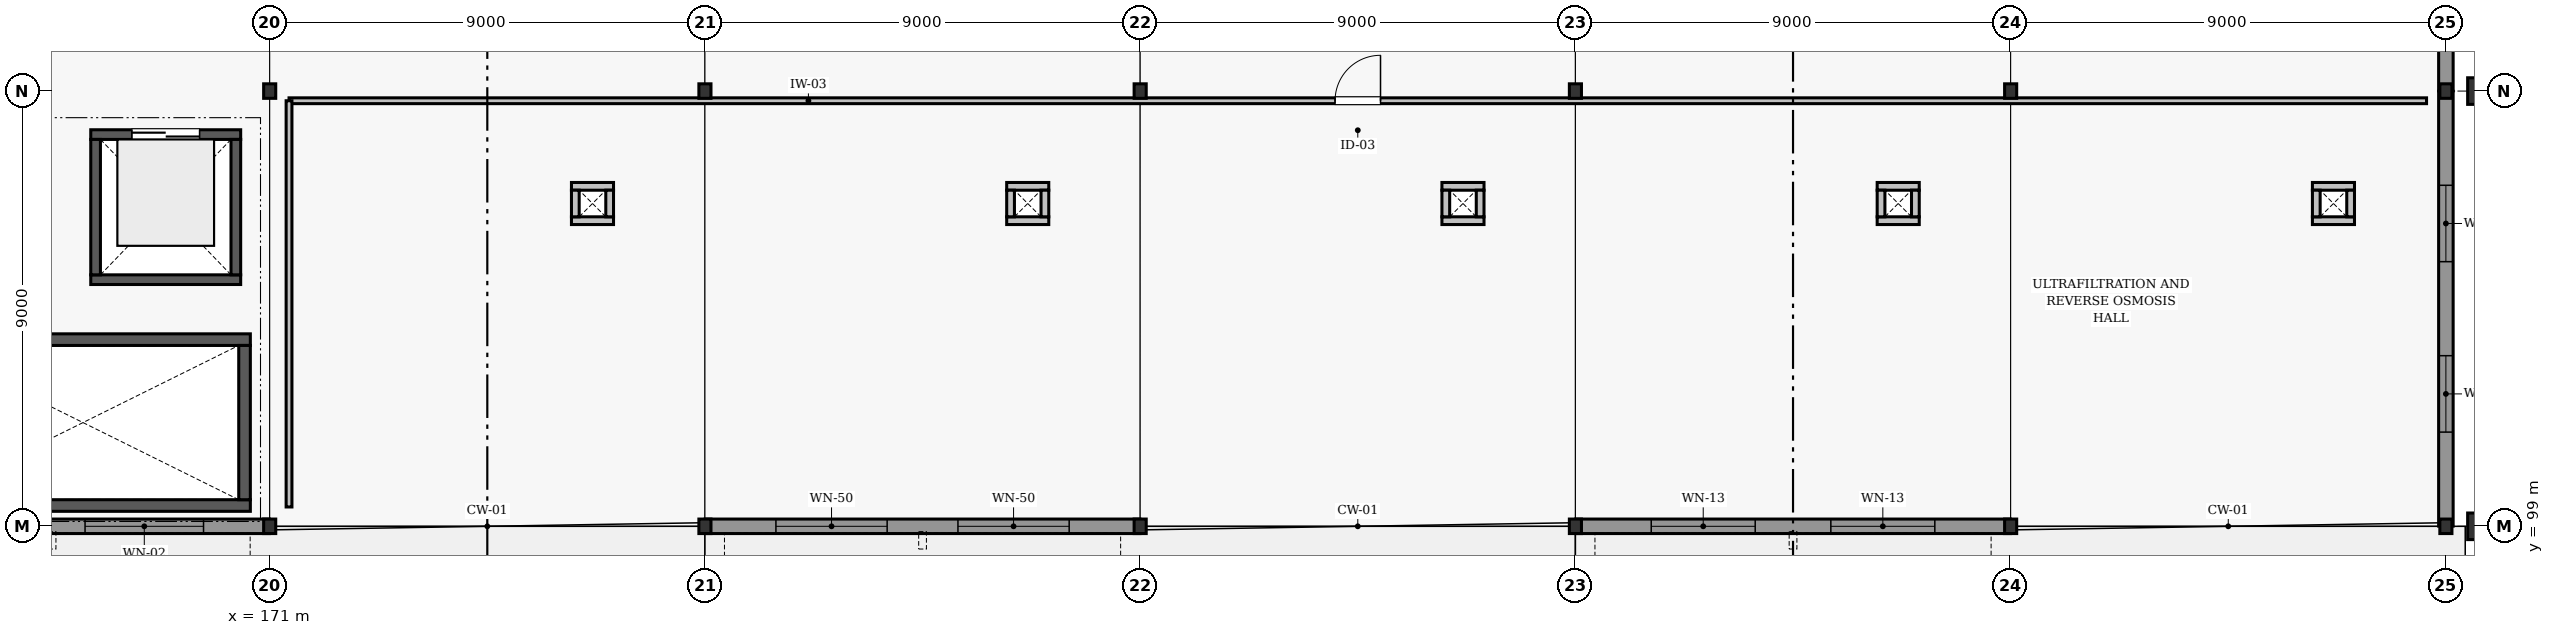
"""IFC4 building model, lengths in metres.
Left out: names, types, materials, properties, quantities, classifications, styles, units other than length and angle.
Written with IfcOpenShell. Run it as: python <this file> out.ifc"""

import sys

from ifc_helpers import new_model, si_unit, direction, frame, frame_2d, origin, origin_2d, place, context, subcontext, project, spatial, rectangle, i_section, extrude, element, fill, save


model = new_model("IFC4")
c1 = context("Model", 3, precision=1e-05, world=origin(), true_north=direction((0.0, 1.0)))
c2 = subcontext(c1, "Body", "Model", "MODEL_VIEW")
j1 = project(units=[si_unit("LENGTHUNIT", "METRE"), si_unit("PLANEANGLEUNIT", "RADIAN")], contexts=[c1])
p1 = place(None, origin())
s1 = spatial("IfcSite", under=j1, at=p1, CompositionType="ELEMENT")
p2 = place(p1, origin())
s2 = spatial("IfcBuilding", under=s1, at=p2, CompositionType="ELEMENT")
p3 = place(p2, frame((0.0, 0.0, 4.8)))
s3 = spatial("IfcBuildingStorey", under=s2, at=p3, CompositionType="ELEMENT", Elevation=4.8)
for number, where, z_axis, x_axis in (
    (1, (171.0, 99.0, 0.0), (0.0, 0.0, 1.0), (1.0, 0.0, 0.0)),
    (2, (171.0, 108.0, 0.0), (0.0, 0.0, 1.0), (1.0, 0.0, 0.0)),
    (3, (180.0, 99.0, 0.0), (0.0, 0.0, 1.0), (1.0, 0.0, 0.0)),
    (4, (180.0, 108.0, 0.0), (0.0, 0.0, 1.0), (1.0, 0.0, 0.0)),
    (5, (189.0, 99.0, 0.0), (0.0, 0.0, 1.0), (1.0, 0.0, 0.0)),
    (6, (189.0, 108.0, 0.0), (0.0, 0.0, 1.0), (1.0, 0.0, 0.0)),
    (7, (198.0, 99.0, 0.0), (0.0, 0.0, 1.0), (1.0, 0.0, 0.0)),
    (8, (198.0, 108.0, 0.0), (0.0, 0.0, 1.0), (1.0, 0.0, 0.0)),
    (9, (207.0, 99.0, 0.0), (0.0, 0.0, 1.0), (1.0, 0.0, 0.0)),
    (10, (207.0, 108.0, 0.0), (0.0, 0.0, 1.0), (1.0, 0.0, 0.0)),
    (11, (216.0, 99.0, 0.0), (0.0, 0.0, 1.0), (1.0, 0.0, 0.0)),
    (12, (216.0, 108.0, 0.0), (0.0, 0.0, 1.0), (1.0, 0.0, 0.0)),
):
    element("IfcColumn", number, at=place(p3, frame(where, z_axis=z_axis, x_axis=x_axis)), inside=s3, PredefinedType="COLUMN", context=c2, shape_type="SweptSolid", body=[
        extrude(i_section(OverallWidth=0.25, OverallDepth=0.3, WebThickness=0.01, FlangeThickness=0.01, FilletRadius=0.012, at=origin_2d()), origin(), (0.0, 0.0, 1.0), 3.6),
    ])
for number, where, z_axis, x_axis in (
    (13, (216.85, 99.0, 0.0), (0.0, 0.0, 1.0), (0.0, 1.0, 0.0)),
    (14, (216.85, 108.0, 0.0), (0.0, 0.0, 1.0), (0.0, 1.0, 0.0)),
):
    element("IfcColumn", number, at=place(p3, frame(where, z_axis=z_axis, x_axis=x_axis)), inside=s3, PredefinedType="PILASTER", context=c2, shape_type="SweptSolid", body=[
        extrude(rectangle(XDim=0.55, YDim=0.8, at=origin_2d()), origin(), (0.0, 0.0, 1.0), 3.6),
    ])
p4 = place(p3, frame((162.004, 99.0, 0.0), z_axis=(0.0, 0.0, 1.0), x_axis=(1.0, 0.0, 0.0)))
e15 = element("IfcWall", 15, at=p4, inside=s3, PredefinedType="SOLIDWALL", context=c2, shape_type="SweptSolid", body=[
    extrude(rectangle(XDim=8.992, YDim=0.3, at=frame_2d((4.496, 0.0))), origin(), (0.0, 0.0, 1.0), 2.842),
])
p5 = place(p4, frame((1.364, 0.0, 1.45)))
e16 = element("IfcOpeningElement", 16, at=p5, cuts=e15, PredefinedType="OPENING", context=c2, shape_type="SweptSolid", body=[
    extrude(rectangle(XDim=2.45, YDim=1.2, at=frame_2d((1.225, 0.6))), frame((0.0, 0.16, 0.0), z_axis=(0.0, -1.0, 0.0), x_axis=(1.0, 0.0, 0.0)), (0.0, 0.0, 1.0), 0.32),
])
p6 = place(p4, frame((5.178, 0.0, 1.45)))
e17 = element("IfcOpeningElement", 17, at=p6, cuts=e15, PredefinedType="OPENING", context=c2, shape_type="SweptSolid", body=[
    extrude(rectangle(XDim=2.45, YDim=1.2, at=frame_2d((1.225, 0.6))), frame((0.0, 0.16, 0.0), z_axis=(0.0, -1.0, 0.0), x_axis=(1.0, 0.0, 0.0)), (0.0, 0.0, 1.0), 0.32),
])
p7 = place(p3, frame((180.004, 99.0, 0.0), z_axis=(0.0, 0.0, 1.0), x_axis=(1.0, 0.0, 0.0)))
e18 = element("IfcWall", 18, at=p7, inside=s3, PredefinedType="SOLIDWALL", context=c2, shape_type="SweptSolid", body=[
    extrude(rectangle(XDim=8.992, YDim=0.3, at=frame_2d((4.496, 0.0))), origin(), (0.0, 0.0, 1.0), 2.842),
])
p8 = place(p7, frame((1.464, 0.0, 1.5)))
e19 = element("IfcOpeningElement", 19, at=p8, cuts=e18, PredefinedType="OPENING", context=c2, shape_type="SweptSolid", body=[
    extrude(rectangle(XDim=2.3, YDim=1.16, at=frame_2d((1.15, 0.58))), frame((0.0, 0.16, 0.0), z_axis=(0.0, -1.0, 0.0), x_axis=(1.0, 0.0, 0.0)), (0.0, 0.0, 1.0), 0.32),
])
p9 = place(p7, frame((5.228, 0.0, 1.5)))
e20 = element("IfcOpeningElement", 20, at=p9, cuts=e18, PredefinedType="OPENING", context=c2, shape_type="SweptSolid", body=[
    extrude(rectangle(XDim=2.3, YDim=1.16, at=frame_2d((1.15, 0.58))), frame((0.0, 0.16, 0.0), z_axis=(0.0, -1.0, 0.0), x_axis=(1.0, 0.0, 0.0)), (0.0, 0.0, 1.0), 0.32),
])
p10 = place(p3, frame((198.004, 99.0, 0.0), z_axis=(0.0, 0.0, 1.0), x_axis=(1.0, 0.0, 0.0)))
e21 = element("IfcWall", 21, at=p10, inside=s3, PredefinedType="SOLIDWALL", context=c2, shape_type="SweptSolid", body=[
    extrude(rectangle(XDim=8.992, YDim=0.3, at=frame_2d((4.496, 0.0))), origin(), (0.0, 0.0, 1.0), 2.842),
])
p11 = place(p10, frame((1.564, 0.0, 1.5)))
e22 = element("IfcOpeningElement", 22, at=p11, cuts=e21, PredefinedType="OPENING", context=c2, shape_type="SweptSolid", body=[
    extrude(rectangle(XDim=2.15, YDim=1.12, at=frame_2d((1.075, 0.56))), frame((0.0, 0.16, 0.0), z_axis=(0.0, -1.0, 0.0), x_axis=(1.0, 0.0, 0.0)), (0.0, 0.0, 1.0), 0.32),
])
p12 = place(p10, frame((5.278, 0.0, 1.5)))
e23 = element("IfcOpeningElement", 23, at=p12, cuts=e21, PredefinedType="OPENING", context=c2, shape_type="SweptSolid", body=[
    extrude(rectangle(XDim=2.15, YDim=1.12, at=frame_2d((1.075, 0.56))), frame((0.0, 0.16, 0.0), z_axis=(0.0, -1.0, 0.0), x_axis=(1.0, 0.0, 0.0)), (0.0, 0.0, 1.0), 0.32),
])
p13 = place(p3, frame((216.0, 99.004, 0.0), z_axis=(0.0, 0.0, 1.0), x_axis=(0.0, 1.0, 0.0)))
e24 = element("IfcWall", 24, at=p13, inside=s3, PredefinedType="SOLIDWALL", context=c2, shape_type="SweptSolid", body=[
    extrude(rectangle(XDim=8.992, YDim=0.3, at=frame_2d((4.496, 0.0))), origin(), (0.0, 0.0, 1.0), 2.842),
])
p14 = place(p13, frame((1.944, 0.0, 0.85)))
e25 = element("IfcOpeningElement", 25, at=p14, cuts=e24, PredefinedType="OPENING", context=c2, shape_type="SweptSolid", body=[
    extrude(rectangle(XDim=1.58, YDim=1.6, at=frame_2d((0.79, 0.8))), frame((0.0, 0.16, 0.0), z_axis=(0.0, -1.0, 0.0), x_axis=(1.0, 0.0, 0.0)), (0.0, 0.0, 1.0), 0.32),
])
p15 = place(p13, frame((5.468, 0.0, 0.85)))
e26 = element("IfcOpeningElement", 26, at=p15, cuts=e24, PredefinedType="OPENING", context=c2, shape_type="SweptSolid", body=[
    extrude(rectangle(XDim=1.58, YDim=1.6, at=frame_2d((0.79, 0.8))), frame((0.0, 0.16, 0.0), z_axis=(0.0, -1.0, 0.0), x_axis=(1.0, 0.0, 0.0)), (0.0, 0.0, 1.0), 0.32),
])
p16 = place(p3, frame((216.0, 108.004, 0.0), z_axis=(0.0, 0.0, 1.0), x_axis=(0.0, 1.0, 0.0)))
e27 = element("IfcWall", 27, at=p16, inside=s3, PredefinedType="SOLIDWALL", context=c2, shape_type="SweptSolid", body=[
    extrude(rectangle(XDim=8.992, YDim=0.3, at=frame_2d((4.496, 0.0))), origin(), (0.0, 0.0, 1.0), 2.842),
])
p17 = place(p16, frame((2.011, 0.0, 0.85)))
e28 = element("IfcOpeningElement", 28, at=p17, cuts=e27, PredefinedType="OPENING", context=c2, shape_type="SweptSolid", body=[
    extrude(rectangle(XDim=1.48, YDim=1.56, at=frame_2d((0.74, 0.78))), frame((0.0, 0.16, 0.0), z_axis=(0.0, -1.0, 0.0), x_axis=(1.0, 0.0, 0.0)), (0.0, 0.0, 1.0), 0.32),
])
p18 = place(p16, frame((5.501, 0.0, 0.85)))
e29 = element("IfcOpeningElement", 29, at=p18, cuts=e27, PredefinedType="OPENING", context=c2, shape_type="SweptSolid", body=[
    extrude(rectangle(XDim=1.48, YDim=1.56, at=frame_2d((0.74, 0.78))), frame((0.0, 0.16, 0.0), z_axis=(0.0, -1.0, 0.0), x_axis=(1.0, 0.0, 0.0)), (0.0, 0.0, 1.0), 0.32),
])
p19 = place(p3, frame((162.16, 99.43, 0.0), z_axis=(0.0, 0.0, 1.0), x_axis=(1.0, 0.0, 0.0)))
e30 = element("IfcWall", 30, at=p19, inside=s3, PredefinedType="SHEAR", context=c2, shape_type="SweptSolid", body=[
    extrude(rectangle(XDim=8.44, YDim=0.24, at=frame_2d((4.22, 0.0))), origin(), (0.0, 0.0, 1.0), 3.35),
])
p20 = place(p3, frame((162.16, 102.86, 0.0), z_axis=(0.0, 0.0, 1.0), x_axis=(1.0, 0.0, 0.0)))
e31 = element("IfcWall", 31, at=p20, inside=s3, PredefinedType="SHEAR", context=c2, shape_type="SweptSolid", body=[
    extrude(rectangle(XDim=8.44, YDim=0.24, at=frame_2d((4.22, 0.0))), origin(), (0.0, 0.0, 1.0), 3.35),
])
p21 = place(p20, frame((0.46, 0.0, 0.0)))
e32 = element("IfcOpeningElement", 32, at=p21, cuts=e31, PredefinedType="OPENING", context=c2, shape_type="SweptSolid", body=[
    extrude(rectangle(XDim=1.08, YDim=2.08, at=frame_2d((0.54, 1.04))), frame((0.0, 0.13, 0.0), z_axis=(0.0, -1.0, 0.0), x_axis=(1.0, 0.0, 0.0)), (0.0, 0.0, 1.0), 0.26),
])
p22 = place(p3, frame((170.48, 99.55, 0.0), z_axis=(0.0, 0.0, 1.0), x_axis=(0.0, 1.0, 0.0)))
e33 = element("IfcWall", 33, at=p22, inside=s3, PredefinedType="SHEAR", context=c2, shape_type="SweptSolid", body=[
    extrude(rectangle(XDim=3.19, YDim=0.24, at=frame_2d((1.595, 0.0))), origin(), (0.0, 0.0, 1.0), 3.35),
])
p23 = place(p3, frame((167.3, 104.1, 0.0), z_axis=(0.0, 0.0, 1.0), x_axis=(1.0, 0.0, 0.0)))
e34 = element("IfcWall", 34, at=p23, inside=s3, PredefinedType="SHEAR", context=c2, shape_type="SweptSolid", body=[
    extrude(rectangle(XDim=3.1, YDim=0.2, at=frame_2d((1.55, 0.0))), origin(), (0.0, 0.0, 1.0), 3.35),
])
p24 = place(p3, frame((167.3, 107.1, 0.0), z_axis=(0.0, 0.0, 1.0), x_axis=(1.0, 0.0, 0.0)))
e35 = element("IfcWall", 35, at=p24, inside=s3, PredefinedType="SHEAR", context=c2, shape_type="SweptSolid", body=[
    extrude(rectangle(XDim=3.1, YDim=0.2, at=frame_2d((1.55, 0.0))), origin(), (0.0, 0.0, 1.0), 3.35),
])
p25 = place(p24, frame((0.85, 0.0, 0.0)))
e36 = element("IfcOpeningElement", 36, at=p25, cuts=e35, PredefinedType="OPENING", context=c2, shape_type="SweptSolid", body=[
    extrude(rectangle(XDim=1.4, YDim=2.15, at=frame_2d((0.7, 1.075))), frame((0.0, 0.11, 0.0), z_axis=(0.0, -1.0, 0.0), x_axis=(1.0, 0.0, 0.0)), (0.0, 0.0, 1.0), 0.22),
])
for number, where, z_axis, x_axis in (
    (37, (167.4, 104.2, 0.0), (0.0, 0.0, 1.0), (0.0, 1.0, 0.0)),
    (38, (170.3, 104.2, 0.0), (0.0, 0.0, 1.0), (0.0, 1.0, 0.0)),
):
    element("IfcWall", number, at=place(p3, frame(where, z_axis=z_axis, x_axis=x_axis)), inside=s3, PredefinedType="SHEAR", context=c2, shape_type="SweptSolid", body=[
        extrude(rectangle(XDim=2.8, YDim=0.2, at=frame_2d((1.4, 0.0))), origin(), (0.0, 0.0, 1.0), 3.35),
    ])
for number, where, z_axis, x_axis in (
    (39, (177.24, 105.32, 0.0), (0.0, 0.0, 1.0), (1.0, 0.0, 0.0)),
    (40, (177.24, 106.03, 0.0), (0.0, 0.0, 1.0), (1.0, 0.0, 0.0)),
):
    element("IfcWall", number, at=place(p3, frame(where, z_axis=z_axis, x_axis=x_axis)), inside=s3, PredefinedType="PARTITIONING", context=c2, shape_type="SweptSolid", body=[
        extrude(rectangle(XDim=0.87, YDim=0.16, at=frame_2d((0.435, 0.0))), origin(), (0.0, 0.0, 1.0), 3.35),
    ])
for number, where, z_axis, x_axis in (
    (41, (177.32, 105.4, 0.0), (0.0, 0.0, 1.0), (0.0, 1.0, 0.0)),
    (42, (178.03, 105.4, 0.0), (0.0, 0.0, 1.0), (0.0, 1.0, 0.0)),
):
    element("IfcWall", number, at=place(p3, frame(where, z_axis=z_axis, x_axis=x_axis)), inside=s3, PredefinedType="PARTITIONING", context=c2, shape_type="SweptSolid", body=[
        extrude(rectangle(XDim=0.55, YDim=0.16, at=frame_2d((0.275, 0.0))), origin(), (0.0, 0.0, 1.0), 3.35),
    ])
for number, where, z_axis, x_axis in (
    (43, (186.24, 105.32, 0.0), (0.0, 0.0, 1.0), (1.0, 0.0, 0.0)),
    (44, (186.24, 106.03, 0.0), (0.0, 0.0, 1.0), (1.0, 0.0, 0.0)),
):
    element("IfcWall", number, at=place(p3, frame(where, z_axis=z_axis, x_axis=x_axis)), inside=s3, PredefinedType="PARTITIONING", context=c2, shape_type="SweptSolid", body=[
        extrude(rectangle(XDim=0.87, YDim=0.16, at=frame_2d((0.435, 0.0))), origin(), (0.0, 0.0, 1.0), 3.35),
    ])
for number, where, z_axis, x_axis in (
    (45, (186.32, 105.4, 0.0), (0.0, 0.0, 1.0), (0.0, 1.0, 0.0)),
    (46, (187.03, 105.4, 0.0), (0.0, 0.0, 1.0), (0.0, 1.0, 0.0)),
):
    element("IfcWall", number, at=place(p3, frame(where, z_axis=z_axis, x_axis=x_axis)), inside=s3, PredefinedType="PARTITIONING", context=c2, shape_type="SweptSolid", body=[
        extrude(rectangle(XDim=0.55, YDim=0.16, at=frame_2d((0.275, 0.0))), origin(), (0.0, 0.0, 1.0), 3.35),
    ])
for number, where, z_axis, x_axis in (
    (47, (195.24, 105.32, 0.0), (0.0, 0.0, 1.0), (1.0, 0.0, 0.0)),
    (48, (195.24, 106.03, 0.0), (0.0, 0.0, 1.0), (1.0, 0.0, 0.0)),
):
    element("IfcWall", number, at=place(p3, frame(where, z_axis=z_axis, x_axis=x_axis)), inside=s3, PredefinedType="PARTITIONING", context=c2, shape_type="SweptSolid", body=[
        extrude(rectangle(XDim=0.87, YDim=0.16, at=frame_2d((0.435, 0.0))), origin(), (0.0, 0.0, 1.0), 3.35),
    ])
for number, where, z_axis, x_axis in (
    (49, (195.32, 105.4, 0.0), (0.0, 0.0, 1.0), (0.0, 1.0, 0.0)),
    (50, (196.03, 105.4, 0.0), (0.0, 0.0, 1.0), (0.0, 1.0, 0.0)),
):
    element("IfcWall", number, at=place(p3, frame(where, z_axis=z_axis, x_axis=x_axis)), inside=s3, PredefinedType="PARTITIONING", context=c2, shape_type="SweptSolid", body=[
        extrude(rectangle(XDim=0.55, YDim=0.16, at=frame_2d((0.275, 0.0))), origin(), (0.0, 0.0, 1.0), 3.35),
    ])
for number, where, z_axis, x_axis in (
    (51, (204.24, 105.32, 0.0), (0.0, 0.0, 1.0), (1.0, 0.0, 0.0)),
    (52, (204.24, 106.03, 0.0), (0.0, 0.0, 1.0), (1.0, 0.0, 0.0)),
):
    element("IfcWall", number, at=place(p3, frame(where, z_axis=z_axis, x_axis=x_axis)), inside=s3, PredefinedType="PARTITIONING", context=c2, shape_type="SweptSolid", body=[
        extrude(rectangle(XDim=0.87, YDim=0.16, at=frame_2d((0.435, 0.0))), origin(), (0.0, 0.0, 1.0), 3.35),
    ])
for number, where, z_axis, x_axis in (
    (53, (204.32, 105.4, 0.0), (0.0, 0.0, 1.0), (0.0, 1.0, 0.0)),
    (54, (205.03, 105.4, 0.0), (0.0, 0.0, 1.0), (0.0, 1.0, 0.0)),
):
    element("IfcWall", number, at=place(p3, frame(where, z_axis=z_axis, x_axis=x_axis)), inside=s3, PredefinedType="PARTITIONING", context=c2, shape_type="SweptSolid", body=[
        extrude(rectangle(XDim=0.55, YDim=0.16, at=frame_2d((0.275, 0.0))), origin(), (0.0, 0.0, 1.0), 3.35),
    ])
for number, where, z_axis, x_axis in (
    (55, (213.24, 105.32, 0.0), (0.0, 0.0, 1.0), (1.0, 0.0, 0.0)),
    (56, (213.24, 106.03, 0.0), (0.0, 0.0, 1.0), (1.0, 0.0, 0.0)),
):
    element("IfcWall", number, at=place(p3, frame(where, z_axis=z_axis, x_axis=x_axis)), inside=s3, PredefinedType="PARTITIONING", context=c2, shape_type="SweptSolid", body=[
        extrude(rectangle(XDim=0.87, YDim=0.16, at=frame_2d((0.435, 0.0))), origin(), (0.0, 0.0, 1.0), 3.35),
    ])
for number, where, z_axis, x_axis in (
    (57, (213.32, 105.4, 0.0), (0.0, 0.0, 1.0), (0.0, 1.0, 0.0)),
    (58, (214.03, 105.4, 0.0), (0.0, 0.0, 1.0), (0.0, 1.0, 0.0)),
):
    element("IfcWall", number, at=place(p3, frame(where, z_axis=z_axis, x_axis=x_axis)), inside=s3, PredefinedType="PARTITIONING", context=c2, shape_type="SweptSolid", body=[
        extrude(rectangle(XDim=0.55, YDim=0.16, at=frame_2d((0.275, 0.0))), origin(), (0.0, 0.0, 1.0), 3.35),
    ])
p26 = place(p3, frame((171.4, 107.8, 0.0), z_axis=(0.0, 0.0, 1.0), x_axis=(1.0, 0.0, 0.0)))
e59 = element("IfcWall", 59, at=p26, inside=s3, PredefinedType="PARTITIONING", context=c2, shape_type="SweptSolid", body=[
    extrude(rectangle(XDim=44.2, YDim=0.12, at=frame_2d((22.1, 0.0))), origin(), (0.0, 0.0, 1.0), 2.845),
])
p27 = place(p26, frame((21.63, 0.0, 0.0)))
e60 = element("IfcOpeningElement", 60, at=p27, cuts=e59, PredefinedType="OPENING", context=c2, shape_type="SweptSolid", body=[
    extrude(rectangle(XDim=0.94, YDim=2.06, at=frame_2d((0.47, 1.03))), frame((0.0, 0.07, 0.0), z_axis=(0.0, -1.0, 0.0), x_axis=(1.0, 0.0, 0.0)), (0.0, 0.0, 1.0), 0.14),
])
p28 = place(p3, frame((171.4, 99.4, 0.0), z_axis=(0.0, 0.0, 1.0), x_axis=(0.0, 1.0, 0.0)))
e61 = element("IfcWall", 61, at=p28, inside=s3, PredefinedType="PARTITIONING", context=c2, shape_type="SweptSolid", body=[
    extrude(rectangle(XDim=8.4, YDim=0.12, at=frame_2d((4.2, 0.0))), origin(), (0.0, 0.0, 1.0), 3.35),
])
p29 = place(p6, origin())
e62 = element("IfcWindow", 62, at=p29, inside=s3, PartitioningType="SINGLE_PANEL", PredefinedType="WINDOW", context=c2, shape_type="SweptSolid", body=[
    extrude(rectangle(XDim=2.45, YDim=1.2, at=frame_2d((1.225, 0.6))), frame((0.0, 0.03, 0.0), z_axis=(0.0, -1.0, 0.0), x_axis=(1.0, 0.0, 0.0)), (0.0, 0.0, 1.0), 0.06),
])
fill(e17, e62)
p30 = place(p8, origin())
e63 = element("IfcWindow", 63, at=p30, inside=s3, PartitioningType="SINGLE_PANEL", PredefinedType="WINDOW", context=c2, shape_type="SweptSolid", body=[
    extrude(rectangle(XDim=2.3, YDim=1.16, at=frame_2d((1.15, 0.58))), frame((0.0, 0.03, 0.0), z_axis=(0.0, -1.0, 0.0), x_axis=(1.0, 0.0, 0.0)), (0.0, 0.0, 1.0), 0.06),
])
fill(e19, e63)
p31 = place(p9, origin())
e64 = element("IfcWindow", 64, at=p31, inside=s3, PartitioningType="SINGLE_PANEL", PredefinedType="WINDOW", context=c2, shape_type="SweptSolid", body=[
    extrude(rectangle(XDim=2.3, YDim=1.16, at=frame_2d((1.15, 0.58))), frame((0.0, 0.03, 0.0), z_axis=(0.0, -1.0, 0.0), x_axis=(1.0, 0.0, 0.0)), (0.0, 0.0, 1.0), 0.06),
])
fill(e20, e64)
p32 = place(p11, origin())
e65 = element("IfcWindow", 65, at=p32, inside=s3, PartitioningType="SINGLE_PANEL", PredefinedType="WINDOW", context=c2, shape_type="SweptSolid", body=[
    extrude(rectangle(XDim=2.15, YDim=1.12, at=frame_2d((1.075, 0.56))), frame((0.0, 0.03, 0.0), z_axis=(0.0, -1.0, 0.0), x_axis=(1.0, 0.0, 0.0)), (0.0, 0.0, 1.0), 0.06),
])
fill(e22, e65)
p33 = place(p12, origin())
e66 = element("IfcWindow", 66, at=p33, inside=s3, PartitioningType="SINGLE_PANEL", PredefinedType="WINDOW", context=c2, shape_type="SweptSolid", body=[
    extrude(rectangle(XDim=2.15, YDim=1.12, at=frame_2d((1.075, 0.56))), frame((0.0, 0.03, 0.0), z_axis=(0.0, -1.0, 0.0), x_axis=(1.0, 0.0, 0.0)), (0.0, 0.0, 1.0), 0.06),
])
fill(e23, e66)
p34 = place(p14, origin())
e67 = element("IfcWindow", 67, at=p34, inside=s3, PartitioningType="SINGLE_PANEL", PredefinedType="WINDOW", context=c2, shape_type="SweptSolid", body=[
    extrude(rectangle(XDim=1.58, YDim=1.6, at=frame_2d((0.79, 0.8))), frame((0.0, 0.03, 0.0), z_axis=(0.0, -1.0, 0.0), x_axis=(1.0, 0.0, 0.0)), (0.0, 0.0, 1.0), 0.06),
])
fill(e25, e67)
p35 = place(p15, origin())
e68 = element("IfcWindow", 68, at=p35, inside=s3, PartitioningType="SINGLE_PANEL", PredefinedType="WINDOW", context=c2, shape_type="SweptSolid", body=[
    extrude(rectangle(XDim=1.58, YDim=1.6, at=frame_2d((0.79, 0.8))), frame((0.0, 0.03, 0.0), z_axis=(0.0, -1.0, 0.0), x_axis=(1.0, 0.0, 0.0)), (0.0, 0.0, 1.0), 0.06),
])
fill(e26, e68)
p36 = place(p25, origin())
e69 = element("IfcDoor", 69, at=p36, inside=s3, OperationType="DOUBLE_DOOR_SLIDING", PredefinedType="DOOR", context=c2, shape_type="SweptSolid", body=[
    extrude(rectangle(XDim=1.4, YDim=2.15, at=frame_2d((0.7, 1.075))), frame((0.0, 0.025, 0.0), z_axis=(0.0, -1.0, 0.0), x_axis=(1.0, 0.0, 0.0)), (0.0, 0.0, 1.0), 0.05),
])
fill(e36, e69)
p37 = place(p27, origin())
e70 = element("IfcDoor", 70, at=p37, inside=s3, OperationType="SINGLE_SWING_RIGHT", PredefinedType="DOOR", context=c2, shape_type="SweptSolid", body=[
    extrude(rectangle(XDim=0.94, YDim=2.06, at=frame_2d((0.47, 1.03))), frame((0.0, 0.025, 0.0), z_axis=(0.0, -1.0, 0.0), x_axis=(1.0, 0.0, 0.0)), (0.0, 0.0, 1.0), 0.05),
])
fill(e60, e70)
save(model, sys.argv[1])
